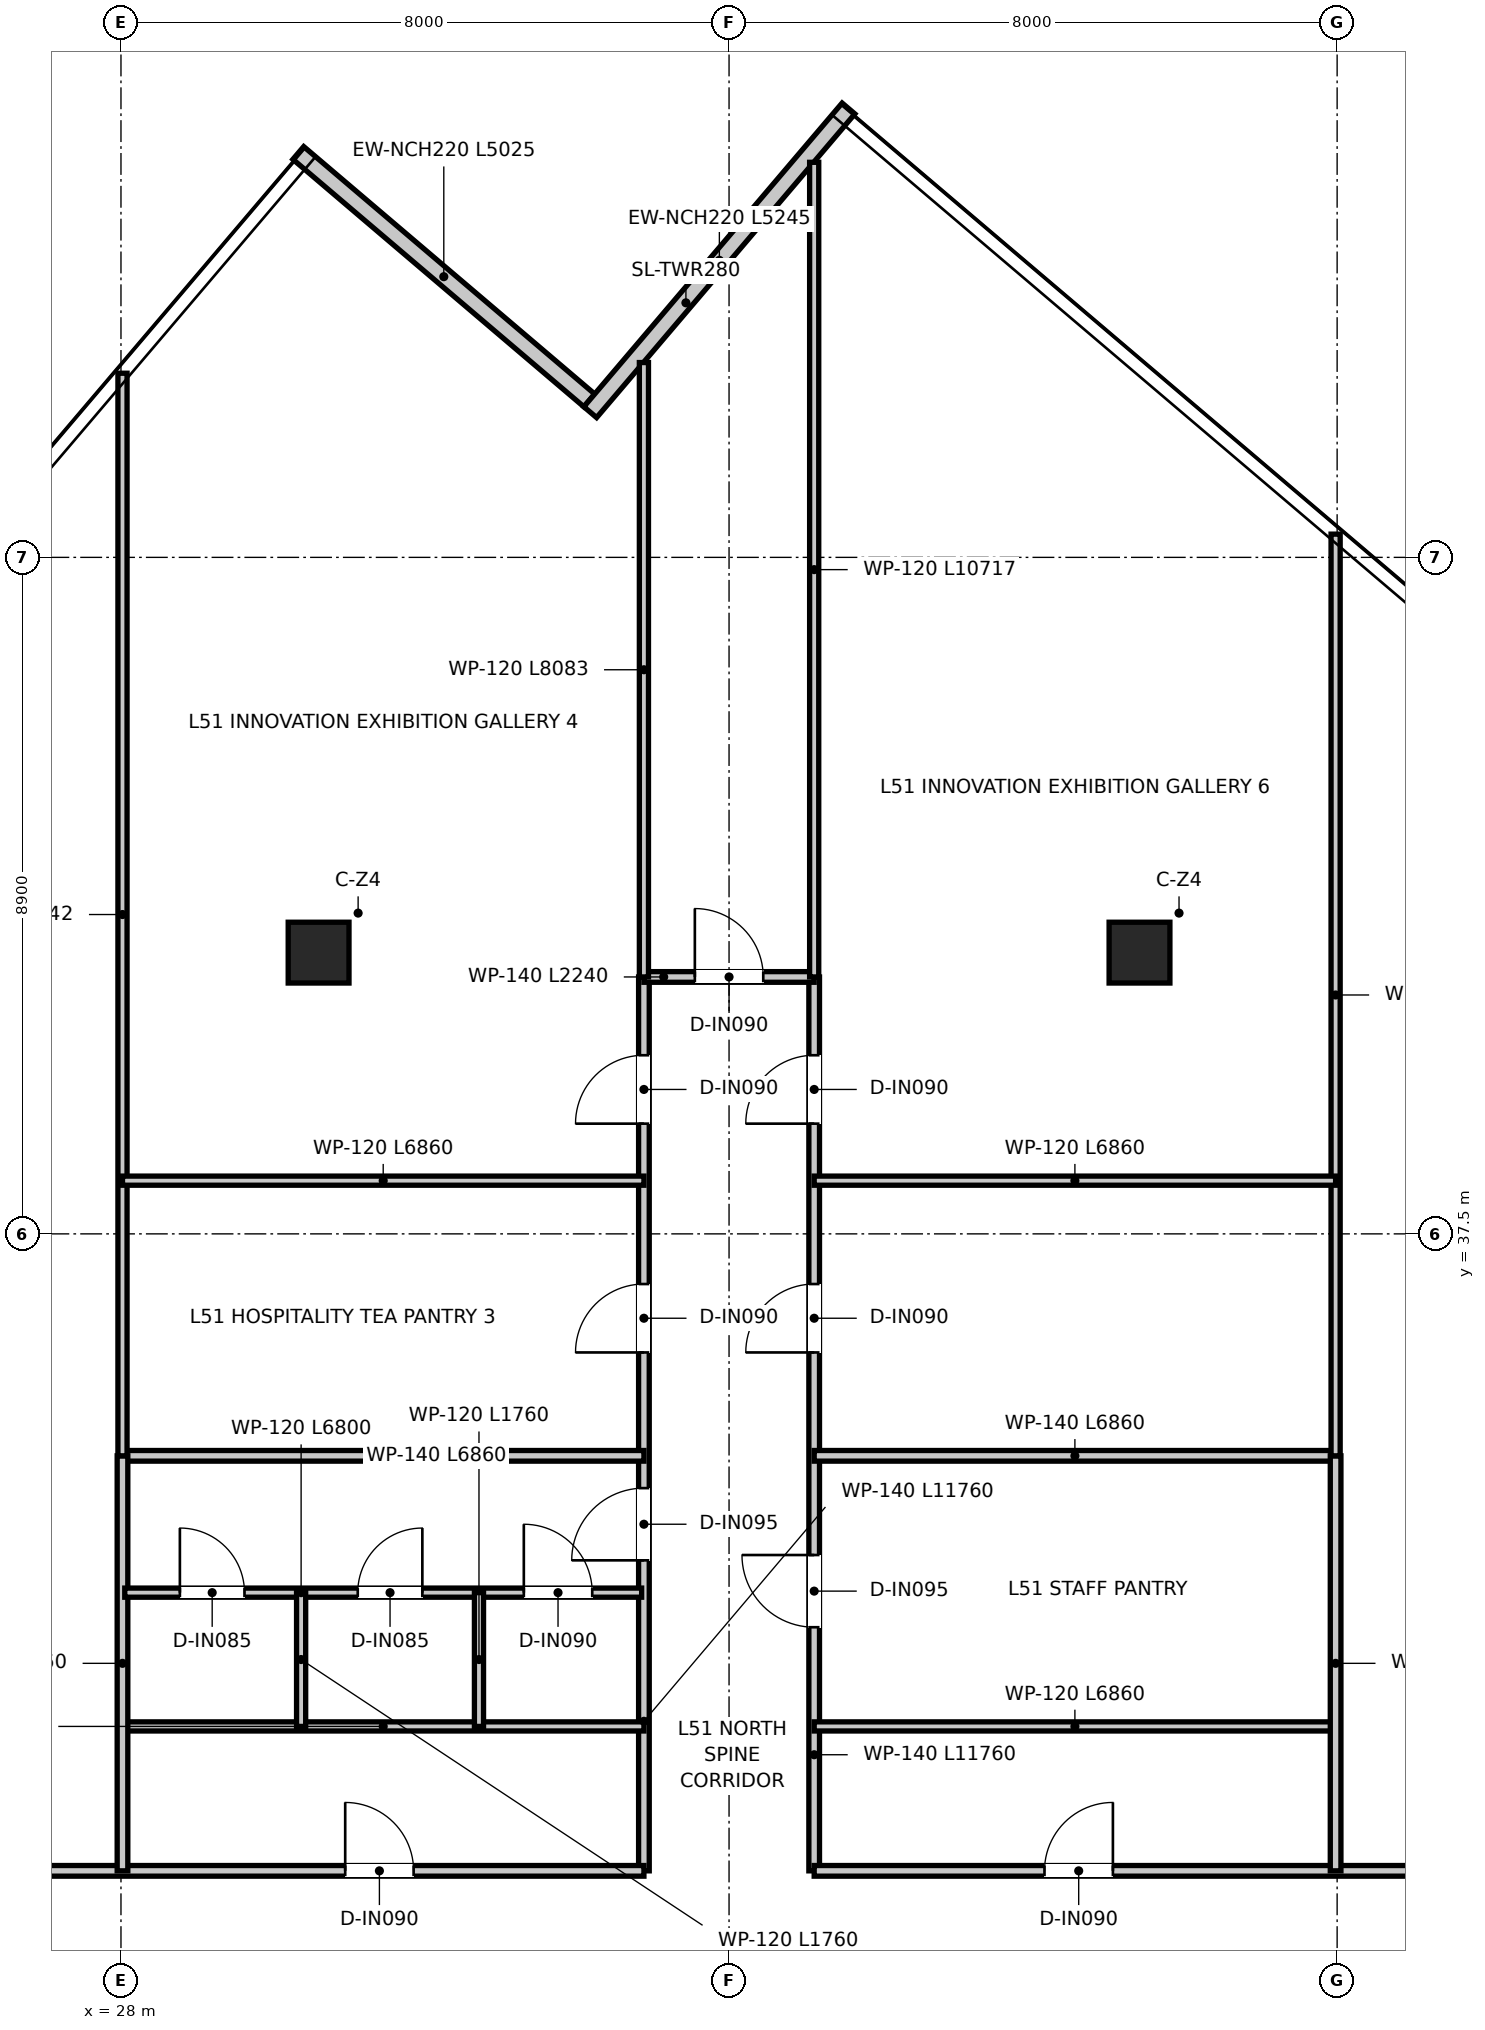
"""IFC4 building model, lengths in metres.
Left out: names, types, materials, properties, quantities, classifications, styles, units other than length and angle.
Written with IfcOpenShell. Run it as: python <this file> out.ifc"""

import sys

from ifc_helpers import new_model, si_unit, direction, frame, frame_2d, origin, origin_2d, place, context, subcontext, project, spatial, rectangle, extrude, source, transform, mapped, element, fill, save


model = new_model("IFC4")
c1 = context("Model", 3, precision=1e-05, world=origin(), true_north=direction((0.0, 1.0)))
c2 = subcontext(c1, "Body", "Model", "MODEL_VIEW")
j1 = project(units=[si_unit("LENGTHUNIT", "METRE"), si_unit("PLANEANGLEUNIT", "RADIAN")], contexts=[c1])
p1 = place(None, origin())
s1 = spatial("IfcSite", under=j1, at=p1, CompositionType="ELEMENT")
p2 = place(p1, origin())
s2 = spatial("IfcBuilding", under=s1, at=p2, CompositionType="ELEMENT")
p3 = place(p2, frame((0.0, 0.0, 211.25)))
s3 = spatial("IfcBuildingStorey", under=s2, at=p3, CompositionType="ELEMENT", Elevation=211.25)
m1 = source(origin(), c2, "Body", "SweptSolid", [
    extrude(rectangle(XDim=0.8, YDim=0.8, at=origin_2d()), origin(), (0.0, 0.0, 1.0), 3.95),
])
for number, where, z_axis, x_axis in (
    (1, (30.6, 41.2, 0.0), (0.0, 0.0, 1.0), (1.0, 0.0, 0.0)),
    (2, (41.4, 41.2, 0.0), (0.0, 0.0, 1.0), (1.0, 0.0, 0.0)),
):
    element("IfcColumn", number, at=place(p3, frame(where, z_axis=z_axis, x_axis=x_axis)), inside=s3, PredefinedType="COLUMN", context=c2, shape_type="MappedRepresentation", body=[
        mapped(m1, transform((0.0, 0.0, 0.0), x_axis=(1.0, 0.0, 0.0), y_axis=(0.0, 1.0, 0.0), z_axis=(0.0, 0.0, 1.0), scale=1.0)),
    ])
p4 = place(p3, frame((34.161, 48.465, 0.0), z_axis=(0.0, 0.0, 1.0), x_axis=(-0.761819427757, 0.647789440707, 0.0)))
e3 = element("IfcWall", 3, at=p4, inside=s3, PredefinedType="ELEMENTEDWALL", context=c2, shape_type="SweptSolid", body=[
    extrude(rectangle(XDim=5.025, YDim=0.22, at=frame_2d((2.512, 0.0))), origin(), (0.0, 0.0, 1.0), 3.67),
])
p5 = place(p3, frame((37.572, 52.306, 0.0), z_axis=(0.0, 0.0, 1.0), x_axis=(-0.647784873465, -0.761823311346, 0.0)))
e4 = element("IfcWall", 4, at=p5, inside=s3, PredefinedType="ELEMENTEDWALL", context=c2, shape_type="SweptSolid", body=[
    extrude(rectangle(XDim=5.245, YDim=0.22, at=frame_2d((2.623, 0.0))), origin(), (0.0, 0.0, 1.0), 3.67),
])
p6 = place(p3, frame((34.88, 29.12, 0.0), z_axis=(0.0, 0.0, 1.0), x_axis=(0.0, 1.0, 0.0)))
e5 = element("IfcWall", 5, at=p6, inside=s3, PredefinedType="PARTITIONING", context=c2, shape_type="SweptSolid", body=[
    extrude(rectangle(XDim=11.76, YDim=0.14, at=frame_2d((5.88, 0.0))), origin(), (0.0, 0.0, 1.0), 3.03),
])
p7 = place(p6, frame((4.085, 0.0, 0.0)))
e6 = element("IfcOpeningElement", 6, at=p7, cuts=e5, PredefinedType="OPENING", context=c2, shape_type="SweptSolid", body=[
    extrude(rectangle(XDim=0.95, YDim=2.1, at=frame_2d((0.475, 1.05))), frame((0.0, 0.08, 0.0), z_axis=(0.0, -1.0, 0.0), x_axis=(1.0, 0.0, 0.0)), (0.0, 0.0, 1.0), 0.16),
])
p8 = place(p6, frame((6.82, 0.0, 0.0)))
e7 = element("IfcOpeningElement", 7, at=p8, cuts=e5, PredefinedType="OPENING", context=c2, shape_type="SweptSolid", body=[
    extrude(rectangle(XDim=0.9, YDim=2.1, at=frame_2d((0.45, 1.05))), frame((0.0, 0.08, 0.0), z_axis=(0.0, -1.0, 0.0), x_axis=(1.0, 0.0, 0.0)), (0.0, 0.0, 1.0), 0.16),
])
p9 = place(p6, frame((9.83, 0.0, 0.0)))
e8 = element("IfcOpeningElement", 8, at=p9, cuts=e5, PredefinedType="OPENING", context=c2, shape_type="SweptSolid", body=[
    extrude(rectangle(XDim=0.9, YDim=2.1, at=frame_2d((0.45, 1.05))), frame((0.0, 0.08, 0.0), z_axis=(0.0, -1.0, 0.0), x_axis=(1.0, 0.0, 0.0)), (0.0, 0.0, 1.0), 0.16),
])
p10 = place(p3, frame((37.12, 29.12, 0.0), z_axis=(0.0, 0.0, 1.0), x_axis=(0.0, 1.0, 0.0)))
e9 = element("IfcWall", 9, at=p10, inside=s3, PredefinedType="PARTITIONING", context=c2, shape_type="SweptSolid", body=[
    extrude(rectangle(XDim=11.76, YDim=0.14, at=frame_2d((5.88, 0.0))), origin(), (0.0, 0.0, 1.0), 3.03),
])
p11 = place(p10, frame((3.205, 0.0, 0.0)))
e10 = element("IfcOpeningElement", 10, at=p11, cuts=e9, PredefinedType="OPENING", context=c2, shape_type="SweptSolid", body=[
    extrude(rectangle(XDim=0.95, YDim=2.1, at=frame_2d((0.475, 1.05))), frame((0.0, 0.08, 0.0), z_axis=(0.0, -1.0, 0.0), x_axis=(1.0, 0.0, 0.0)), (0.0, 0.0, 1.0), 0.16),
])
p12 = place(p10, frame((6.82, 0.0, 0.0)))
e11 = element("IfcOpeningElement", 11, at=p12, cuts=e9, PredefinedType="OPENING", context=c2, shape_type="SweptSolid", body=[
    extrude(rectangle(XDim=0.9, YDim=2.1, at=frame_2d((0.45, 1.05))), frame((0.0, 0.08, 0.0), z_axis=(0.0, -1.0, 0.0), x_axis=(1.0, 0.0, 0.0)), (0.0, 0.0, 1.0), 0.16),
])
p13 = place(p10, frame((9.83, 0.0, 0.0)))
e12 = element("IfcOpeningElement", 12, at=p13, cuts=e9, PredefinedType="OPENING", context=c2, shape_type="SweptSolid", body=[
    extrude(rectangle(XDim=0.9, YDim=2.1, at=frame_2d((0.45, 1.05))), frame((0.0, 0.08, 0.0), z_axis=(0.0, -1.0, 0.0), x_axis=(1.0, 0.0, 0.0)), (0.0, 0.0, 1.0), 0.16),
])
p14 = place(p3, frame((34.88, 40.88, 0.0), z_axis=(0.0, 0.0, 1.0), x_axis=(1.0, 0.0, 0.0)))
e13 = element("IfcWall", 13, at=p14, inside=s3, PredefinedType="PARTITIONING", context=c2, shape_type="SweptSolid", body=[
    extrude(rectangle(XDim=2.24, YDim=0.14, at=frame_2d((1.12, 0.0))), origin(), (0.0, 0.0, 1.0), 3.67),
])
p15 = place(p14, frame((0.67, 0.0, 0.0)))
e14 = element("IfcOpeningElement", 14, at=p15, cuts=e13, PredefinedType="OPENING", context=c2, shape_type="SweptSolid", body=[
    extrude(rectangle(XDim=0.9, YDim=2.1, at=frame_2d((0.45, 1.05))), frame((0.0, 0.08, 0.0), z_axis=(0.0, -1.0, 0.0), x_axis=(1.0, 0.0, 0.0)), (0.0, 0.0, 1.0), 0.16),
])
p16 = place(p3, frame((11.267, 29.12, 0.0), z_axis=(0.0, 0.0, 1.0), x_axis=(1.0, 0.0, 0.0)))
e15 = element("IfcWall", 15, at=p16, inside=s3, PredefinedType="PARTITIONING", context=c2, shape_type="SweptSolid", body=[
    extrude(rectangle(XDim=23.613, YDim=0.14, at=frame_2d((11.807, 0.0))), origin(), (0.0, 0.0, 1.0), 3.03),
])
p17 = place(p16, frame((19.683, 0.0, 0.0)))
e16 = element("IfcOpeningElement", 16, at=p17, cuts=e15, PredefinedType="OPENING", context=c2, shape_type="SweptSolid", body=[
    extrude(rectangle(XDim=0.9, YDim=2.1, at=frame_2d((0.45, 1.05))), frame((0.0, 0.08, 0.0), z_axis=(0.0, -1.0, 0.0), x_axis=(1.0, 0.0, 0.0)), (0.0, 0.0, 1.0), 0.16),
])
p18 = place(p16, frame((7.809, 0.0, 0.0)))
e17 = element("IfcOpeningElement", 17, at=p18, cuts=e15, PredefinedType="OPENING", context=c2, shape_type="SweptSolid", body=[
    extrude(rectangle(XDim=0.9, YDim=2.1, at=frame_2d((0.45, 1.05))), frame((0.0, 0.08, 0.0), z_axis=(0.0, -1.0, 0.0), x_axis=(1.0, 0.0, 0.0)), (0.0, 0.0, 1.0), 0.16),
])
p19 = place(p3, frame((37.12, 29.12, 0.0), z_axis=(0.0, 0.0, 1.0), x_axis=(1.0, 0.0, 0.0)))
e18 = element("IfcWall", 18, at=p19, inside=s3, PredefinedType="PARTITIONING", context=c2, shape_type="SweptSolid", body=[
    extrude(rectangle(XDim=20.988, YDim=0.14, at=frame_2d((10.494, 0.0))), origin(), (0.0, 0.0, 1.0), 3.03),
])
p20 = place(p19, frame((3.03, 0.0, 0.0)))
e19 = element("IfcOpeningElement", 19, at=p20, cuts=e18, PredefinedType="OPENING", context=c2, shape_type="SweptSolid", body=[
    extrude(rectangle(XDim=0.9, YDim=2.1, at=frame_2d((0.45, 1.05))), frame((0.0, 0.08, 0.0), z_axis=(0.0, -1.0, 0.0), x_axis=(1.0, 0.0, 0.0)), (0.0, 0.0, 1.0), 0.16),
])
p21 = place(p19, frame((14.694, 0.0, 0.0)))
e20 = element("IfcOpeningElement", 20, at=p21, cuts=e18, PredefinedType="OPENING", context=c2, shape_type="SweptSolid", body=[
    extrude(rectangle(XDim=0.9, YDim=2.1, at=frame_2d((0.45, 1.05))), frame((0.0, 0.08, 0.0), z_axis=(0.0, -1.0, 0.0), x_axis=(1.0, 0.0, 0.0)), (0.0, 0.0, 1.0), 0.16),
])
for number, where, z_axis, x_axis in (
    (21, (28.02, 31.02, 0.0), (0.0, 0.0, 1.0), (1.0, 0.0, 0.0)),
    (22, (37.12, 31.02, 0.0), (0.0, 0.0, 1.0), (1.0, 0.0, 0.0)),
):
    element("IfcWall", number, at=place(p3, frame(where, z_axis=z_axis, x_axis=x_axis)), inside=s3, PredefinedType="PARTITIONING", context=c2, shape_type="SweptSolid", body=[
        extrude(rectangle(XDim=6.86, YDim=0.12, at=frame_2d((3.43, 0.0))), origin(), (0.0, 0.0, 1.0), 3.18),
    ])
for number, where, z_axis, x_axis in (
    (23, (28.02, 34.58, 0.0), (0.0, 0.0, 1.0), (1.0, 0.0, 0.0)),
    (24, (37.12, 34.58, 0.0), (0.0, 0.0, 1.0), (1.0, 0.0, 0.0)),
):
    element("IfcWall", number, at=place(p3, frame(where, z_axis=z_axis, x_axis=x_axis)), inside=s3, PredefinedType="PARTITIONING", context=c2, shape_type="SweptSolid", body=[
        extrude(rectangle(XDim=6.86, YDim=0.14, at=frame_2d((3.43, 0.0))), origin(), (0.0, 0.0, 1.0), 3.18),
    ])
for number, where, z_axis, x_axis in (
    (25, (28.02, 29.12, 0.0), (0.0, 0.0, 1.0), (0.0, 1.0, 0.0)),
    (26, (43.98, 29.12, 0.0), (0.0, 0.0, 1.0), (0.0, 1.0, 0.0)),
):
    element("IfcWall", number, at=place(p3, frame(where, z_axis=z_axis, x_axis=x_axis)), inside=s3, PredefinedType="PARTITIONING", context=c2, shape_type="SweptSolid", body=[
        extrude(rectangle(XDim=5.46, YDim=0.14, at=frame_2d((2.73, 0.0))), origin(), (0.0, 0.0, 1.0), 3.37),
    ])
p22 = place(p3, frame((28.05, 32.78, 0.0), z_axis=(0.0, 0.0, 1.0), x_axis=(1.0, 0.0, 0.0)))
e27 = element("IfcWall", 27, at=p22, inside=s3, PredefinedType="PARTITIONING", context=c2, shape_type="SweptSolid", body=[
    extrude(rectangle(XDim=6.8, YDim=0.12, at=frame_2d((3.4, 0.0))), origin(), (0.0, 0.0, 1.0), 3.18),
])
p23 = place(p22, frame((0.725, 0.0, 0.0)))
e28 = element("IfcOpeningElement", 28, at=p23, cuts=e27, PredefinedType="OPENING", context=c2, shape_type="SweptSolid", body=[
    extrude(rectangle(XDim=0.85, YDim=2.1, at=frame_2d((0.425, 1.05))), frame((0.0, 0.07, 0.0), z_axis=(0.0, -1.0, 0.0), x_axis=(1.0, 0.0, 0.0)), (0.0, 0.0, 1.0), 0.14),
])
p24 = place(p22, frame((3.065, 0.0, 0.0)))
e29 = element("IfcOpeningElement", 29, at=p24, cuts=e27, PredefinedType="OPENING", context=c2, shape_type="SweptSolid", body=[
    extrude(rectangle(XDim=0.85, YDim=2.1, at=frame_2d((0.425, 1.05))), frame((0.0, 0.07, 0.0), z_axis=(0.0, -1.0, 0.0), x_axis=(1.0, 0.0, 0.0)), (0.0, 0.0, 1.0), 0.14),
])
p25 = place(p22, frame((5.25, 0.0, 0.0)))
e30 = element("IfcOpeningElement", 30, at=p25, cuts=e27, PredefinedType="OPENING", context=c2, shape_type="SweptSolid", body=[
    extrude(rectangle(XDim=0.9, YDim=2.1, at=frame_2d((0.45, 1.05))), frame((0.0, 0.07, 0.0), z_axis=(0.0, -1.0, 0.0), x_axis=(1.0, 0.0, 0.0)), (0.0, 0.0, 1.0), 0.14),
])
p26 = place(p3, frame((30.37, 31.02, 0.0), z_axis=(0.0, 0.0, 1.0), x_axis=(0.0, 1.0, 0.0)))
e31 = element("IfcWall", 31, at=p26, inside=s3, PredefinedType="PARTITIONING", context=c2, shape_type="SweptSolid", body=[
    extrude(rectangle(XDim=1.76, YDim=0.12, at=frame_2d((0.88, 0.0))), origin(), (0.0, 0.0, 1.0), 3.18),
])
p27 = place(p3, frame((32.71, 31.02, 0.0), z_axis=(0.0, 0.0, 1.0), x_axis=(0.0, 1.0, 0.0)))
e32 = element("IfcWall", 32, at=p27, inside=s3, PredefinedType="PARTITIONING", context=c2, shape_type="SweptSolid", body=[
    extrude(rectangle(XDim=1.76, YDim=0.12, at=frame_2d((0.88, 0.0))), origin(), (0.0, 0.0, 1.0), 3.67),
])
p28 = place(p3, frame((34.88, 40.88, 0.0), z_axis=(0.0, 0.0, 1.0), x_axis=(0.0, 1.0, 0.0)))
e33 = element("IfcWall", 33, at=p28, inside=s3, PredefinedType="PARTITIONING", context=c2, shape_type="SweptSolid", body=[
    extrude(rectangle(XDim=8.083, YDim=0.12, at=frame_2d((4.042, 0.0))), origin(), (0.0, 0.0, 1.0), 3.28),
])
p29 = place(p3, frame((37.12, 40.88, 0.0), z_axis=(0.0, 0.0, 1.0), x_axis=(0.0, 1.0, 0.0)))
e34 = element("IfcWall", 34, at=p29, inside=s3, PredefinedType="PARTITIONING", context=c2, shape_type="SweptSolid", body=[
    extrude(rectangle(XDim=10.718, YDim=0.12, at=frame_2d((5.359, 0.0))), origin(), (0.0, 0.0, 1.0), 3.28),
])
p30 = place(p3, frame((28.02, 34.58, 0.0), z_axis=(0.0, 0.0, 1.0), x_axis=(0.0, 1.0, 0.0)))
e35 = element("IfcWall", 35, at=p30, inside=s3, PredefinedType="PARTITIONING", context=c2, shape_type="SweptSolid", body=[
    extrude(rectangle(XDim=14.242, YDim=0.12, at=frame_2d((7.121, 0.0))), origin(), (0.0, 0.0, 1.0), 3.03),
])
p31 = place(p3, frame((43.98, 34.58, 0.0), z_axis=(0.0, 0.0, 1.0), x_axis=(0.0, 1.0, 0.0)))
e36 = element("IfcWall", 36, at=p31, inside=s3, PredefinedType="PARTITIONING", context=c2, shape_type="SweptSolid", body=[
    extrude(rectangle(XDim=12.125, YDim=0.12, at=frame_2d((6.063, 0.0))), origin(), (0.0, 0.0, 1.0), 3.03),
])
for number, where, z_axis, x_axis in (
    (37, (28.02, 38.2, 0.0), (0.0, 0.0, 1.0), (1.0, 0.0, 0.0)),
    (38, (37.12, 38.2, 0.0), (0.0, 0.0, 1.0), (1.0, 0.0, 0.0)),
):
    element("IfcWall", number, at=place(p3, frame(where, z_axis=z_axis, x_axis=x_axis)), inside=s3, PredefinedType="PARTITIONING", context=c2, shape_type="SweptSolid", body=[
        extrude(rectangle(XDim=6.86, YDim=0.12, at=frame_2d((3.43, 0.0))), origin(), (0.0, 0.0, 1.0), 3.18),
    ])
p32 = place(p17, origin())
e39 = element("IfcDoor", 39, at=p32, inside=s3, OperationType="SINGLE_SWING_LEFT", PredefinedType="DOOR", context=c2, shape_type="SweptSolid", body=[
    extrude(rectangle(XDim=0.9, YDim=2.1, at=frame_2d((0.45, 1.05))), frame((0.0, 0.025, 0.0), z_axis=(0.0, -1.0, 0.0), x_axis=(1.0, 0.0, 0.0)), (0.0, 0.0, 1.0), 0.05),
])
fill(e16, e39)
p33 = place(p20, origin())
e40 = element("IfcDoor", 40, at=p33, inside=s3, OperationType="SINGLE_SWING_RIGHT", PredefinedType="DOOR", context=c2, shape_type="SweptSolid", body=[
    extrude(rectangle(XDim=0.9, YDim=2.1, at=frame_2d((0.45, 1.05))), frame((0.0, 0.025, 0.0), z_axis=(0.0, -1.0, 0.0), x_axis=(1.0, 0.0, 0.0)), (0.0, 0.0, 1.0), 0.05),
])
fill(e19, e40)
p34 = place(p7, origin())
e41 = element("IfcDoor", 41, at=p34, inside=s3, OperationType="SINGLE_SWING_LEFT", PredefinedType="DOOR", context=c2, shape_type="SweptSolid", body=[
    extrude(rectangle(XDim=0.95, YDim=2.1, at=frame_2d((0.475, 1.05))), frame((0.0, 0.025, 0.0), z_axis=(0.0, -1.0, 0.0), x_axis=(1.0, 0.0, 0.0)), (0.0, 0.0, 1.0), 0.05),
])
fill(e6, e41)
p35 = place(p11, origin())
e42 = element("IfcDoor", 42, at=p35, inside=s3, OperationType="SINGLE_SWING_RIGHT", PredefinedType="DOOR", context=c2, shape_type="SweptSolid", body=[
    extrude(rectangle(XDim=0.95, YDim=2.1, at=frame_2d((0.475, 1.05))), frame((0.0, 0.025, 0.0), z_axis=(0.0, -1.0, 0.0), x_axis=(1.0, 0.0, 0.0)), (0.0, 0.0, 1.0), 0.05),
])
fill(e10, e42)
p36 = place(p23, origin())
e43 = element("IfcDoor", 43, at=p36, inside=s3, OperationType="SINGLE_SWING_LEFT", PredefinedType="DOOR", context=c2, shape_type="SweptSolid", body=[
    extrude(rectangle(XDim=0.85, YDim=2.1, at=frame_2d((0.425, 1.05))), frame((0.0, 0.025, 0.0), z_axis=(0.0, -1.0, 0.0), x_axis=(1.0, 0.0, 0.0)), (0.0, 0.0, 1.0), 0.05),
])
fill(e28, e43)
p37 = place(p24, origin())
e44 = element("IfcDoor", 44, at=p37, inside=s3, OperationType="SINGLE_SWING_RIGHT", PredefinedType="DOOR", context=c2, shape_type="SweptSolid", body=[
    extrude(rectangle(XDim=0.85, YDim=2.1, at=frame_2d((0.425, 1.05))), frame((0.0, 0.025, 0.0), z_axis=(0.0, -1.0, 0.0), x_axis=(1.0, 0.0, 0.0)), (0.0, 0.0, 1.0), 0.05),
])
fill(e29, e44)
p38 = place(p25, origin())
e45 = element("IfcDoor", 45, at=p38, inside=s3, OperationType="SINGLE_SWING_LEFT", PredefinedType="DOOR", context=c2, shape_type="SweptSolid", body=[
    extrude(rectangle(XDim=0.9, YDim=2.1, at=frame_2d((0.45, 1.05))), frame((0.0, 0.025, 0.0), z_axis=(0.0, -1.0, 0.0), x_axis=(1.0, 0.0, 0.0)), (0.0, 0.0, 1.0), 0.05),
])
fill(e30, e45)
p39 = place(p15, origin())
e46 = element("IfcDoor", 46, at=p39, inside=s3, OperationType="SINGLE_SWING_LEFT", PredefinedType="DOOR", context=c2, shape_type="SweptSolid", body=[
    extrude(rectangle(XDim=0.9, YDim=2.1, at=frame_2d((0.45, 1.05))), frame((0.0, 0.025, 0.0), z_axis=(0.0, -1.0, 0.0), x_axis=(1.0, 0.0, 0.0)), (0.0, 0.0, 1.0), 0.05),
])
fill(e14, e46)
p40 = place(p8, origin())
e47 = element("IfcDoor", 47, at=p40, inside=s3, OperationType="SINGLE_SWING_LEFT", PredefinedType="DOOR", context=c2, shape_type="SweptSolid", body=[
    extrude(rectangle(XDim=0.9, YDim=2.1, at=frame_2d((0.45, 1.05))), frame((0.0, 0.025, 0.0), z_axis=(0.0, -1.0, 0.0), x_axis=(1.0, 0.0, 0.0)), (0.0, 0.0, 1.0), 0.05),
])
fill(e7, e47)
p41 = place(p9, origin())
e48 = element("IfcDoor", 48, at=p41, inside=s3, OperationType="SINGLE_SWING_LEFT", PredefinedType="DOOR", context=c2, shape_type="SweptSolid", body=[
    extrude(rectangle(XDim=0.9, YDim=2.1, at=frame_2d((0.45, 1.05))), frame((0.0, 0.025, 0.0), z_axis=(0.0, -1.0, 0.0), x_axis=(1.0, 0.0, 0.0)), (0.0, 0.0, 1.0), 0.05),
])
fill(e8, e48)
p42 = place(p12, origin())
e49 = element("IfcDoor", 49, at=p42, inside=s3, OperationType="SINGLE_SWING_LEFT", PredefinedType="DOOR", context=c2, shape_type="SweptSolid", body=[
    extrude(rectangle(XDim=0.9, YDim=2.1, at=frame_2d((0.45, 1.05))), frame((0.0, 0.025, 0.0), z_axis=(0.0, -1.0, 0.0), x_axis=(1.0, 0.0, 0.0)), (0.0, 0.0, 1.0), 0.05),
])
fill(e11, e49)
p43 = place(p13, origin())
e50 = element("IfcDoor", 50, at=p43, inside=s3, OperationType="SINGLE_SWING_LEFT", PredefinedType="DOOR", context=c2, shape_type="SweptSolid", body=[
    extrude(rectangle(XDim=0.9, YDim=2.1, at=frame_2d((0.45, 1.05))), frame((0.0, 0.025, 0.0), z_axis=(0.0, -1.0, 0.0), x_axis=(1.0, 0.0, 0.0)), (0.0, 0.0, 1.0), 0.05),
])
fill(e12, e50)
save(model, sys.argv[1])
